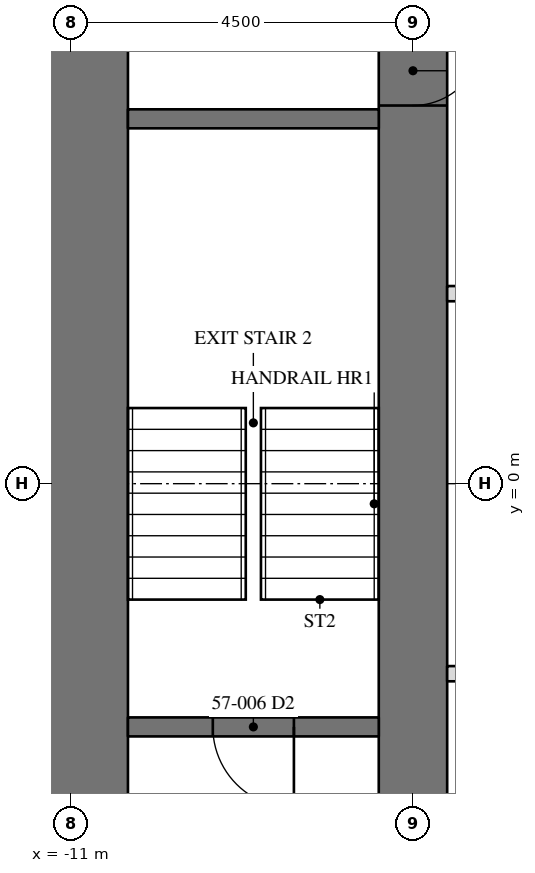
"""IFC4 building model, lengths in metres.
Left out: names, types, materials, properties, quantities, classifications, styles, units other than length and angle.
Written with IfcOpenShell. Run it as: python <this file> out.ifc"""

import sys

from ifc_helpers import new_model, si_unit, direction, frame, frame_2d, origin, place, context, subcontext, project, spatial, rectangle, extrude, element, fill, save


model = new_model("IFC4")
c1 = context("Model", 3, precision=1e-05, world=origin(), true_north=direction((0.0, 1.0)))
c2 = subcontext(c1, "Body", "Model", "MODEL_VIEW")
j1 = project(units=[si_unit("LENGTHUNIT", "METRE"), si_unit("PLANEANGLEUNIT", "RADIAN")], contexts=[c1])
p1 = place(None, origin())
s1 = spatial("IfcSite", under=j1, at=p1, CompositionType="ELEMENT")
p2 = place(p1, origin())
s2 = spatial("IfcBuilding", under=s1, at=p2, CompositionType="ELEMENT")
p3 = place(p2, frame((0.0, 0.0, 236.2)))
s3 = spatial("IfcBuildingStorey", under=s2, at=p3, CompositionType="ELEMENT", Elevation=236.2)
p4 = place(p3, frame((-11.0, 11.0, 0.0), z_axis=(0.0, 0.0, 1.0), x_axis=(0.0, -1.0, 0.0)))
e1 = element("IfcWall", 1, at=p4, inside=s3, PredefinedType="SHEAR", context=c2, shape_type="SweptSolid", body=[
    extrude(rectangle(XDim=22.0, YDim=1.5, at=frame_2d((11.0, 0.0))), origin(), (0.0, 0.0, 1.0), 3.5),
])
p5 = place(p4, frame((15.393, 0.0, 0.0)))
e2 = element("IfcOpeningElement", 2, at=p5, cuts=e1, PredefinedType="OPENING", context=c2, shape_type="SweptSolid", body=[
    extrude(rectangle(XDim=0.915, YDim=2.134, at=frame_2d((0.458, 1.067))), frame((0.0, 0.76, 0.0), z_axis=(0.0, -1.0, 0.0), x_axis=(1.0, 0.0, 0.0)), (0.0, 0.0, 1.0), 1.52),
])
p6 = place(p3, frame((-6.5, 6.5, 0.0), z_axis=(0.0, 0.0, 1.0), x_axis=(0.0, -1.0, 0.0)))
e3 = element("IfcWall", 3, at=p6, inside=s3, PredefinedType="SHEAR", context=c2, shape_type="SweptSolid", body=[
    extrude(rectangle(XDim=13.0, YDim=0.9, at=frame_2d((6.5, 0.0))), origin(), (0.0, 0.0, 1.0), 3.5),
])
p7 = place(p6, frame((10.893, 0.0, 0.0)))
e4 = element("IfcOpeningElement", 4, at=p7, cuts=e3, PredefinedType="OPENING", context=c2, shape_type="SweptSolid", body=[
    extrude(rectangle(XDim=0.915, YDim=2.134, at=frame_2d((0.458, 1.067))), frame((0.0, 0.46, 0.0), z_axis=(0.0, -1.0, 0.0), x_axis=(1.0, 0.0, 0.0)), (0.0, 0.0, 1.0), 0.92),
])
p8 = place(p6, frame((0.61, 0.0, 0.0)))
e5 = element("IfcOpeningElement", 5, at=p8, cuts=e3, PredefinedType="OPENING", context=c2, shape_type="SweptSolid", body=[
    extrude(rectangle(XDim=0.915, YDim=2.134, at=frame_2d((0.458, 1.067))), frame((0.0, 0.46, 0.0), z_axis=(0.0, -1.0, 0.0), x_axis=(1.0, 0.0, 0.0)), (0.0, 0.0, 1.0), 0.92),
])
p9 = place(p3, frame((-6.95, 4.8, 0.0), z_axis=(0.0, 0.0, 1.0), x_axis=(-1.0, 0.0, 0.0)))
e6 = element("IfcWall", 6, at=p9, inside=s3, PredefinedType="SOLIDWALL", context=c2, shape_type="SweptSolid", body=[
    extrude(rectangle(XDim=3.3, YDim=0.25, at=frame_2d((1.65, 0.0))), origin(), (0.0, 0.0, 1.0), 3.31),
])
p10 = place(p3, frame((-6.95, -3.2, 0.0), z_axis=(0.0, 0.0, 1.0), x_axis=(-1.0, 0.0, 0.0)))
e7 = element("IfcWall", 7, at=p10, inside=s3, PredefinedType="SOLIDWALL", context=c2, shape_type="SweptSolid", body=[
    extrude(rectangle(XDim=3.3, YDim=0.25, at=frame_2d((1.65, 0.0))), origin(), (0.0, 0.0, 1.0), 3.31),
])
p11 = place(p10, frame((1.116, 0.0, 0.0)))
e8 = element("IfcOpeningElement", 8, at=p11, cuts=e7, PredefinedType="OPENING", context=c2, shape_type="SweptSolid", body=[
    extrude(rectangle(XDim=1.067, YDim=2.134, at=frame_2d((0.533, 1.067))), frame((0.0, 0.135, 0.0), z_axis=(0.0, -1.0, 0.0), x_axis=(1.0, 0.0, 0.0)), (0.0, 0.0, 1.0), 0.27),
])
for number, where, z_axis, x_axis in (
    (9, (-6.05, 2.5, 0.0), (0.0, 0.0, 1.0), (1.0, 0.0, 0.0)),
    (10, (6.05, -2.5, 0.0), (0.0, 0.0, 1.0), (-1.0, 0.0, 0.0)),
):
    element("IfcWall", number, at=place(p3, frame(where, z_axis=z_axis, x_axis=x_axis)), inside=s3, PredefinedType="PARTITIONING", context=c2, shape_type="SweptSolid", body=[
        extrude(rectangle(XDim=12.1, YDim=0.2, at=frame_2d((6.05, 0.0))), origin(), (0.0, 0.0, 1.0), 3.31),
    ])
p12 = place(p11, origin())
e11 = element("IfcDoor", 11, at=p12, inside=s3, OperationType="SINGLE_SWING_LEFT", PredefinedType="DOOR", context=c2, shape_type="SweptSolid", body=[
    extrude(rectangle(XDim=1.067, YDim=2.134, at=frame_2d((0.533, 1.067))), frame((0.0, 0.025, 0.0), z_axis=(0.0, -1.0, 0.0), x_axis=(1.0, 0.0, 0.0)), (0.0, 0.0, 1.0), 0.05),
])
fill(e8, e11)
p13 = place(p8, origin())
e12 = element("IfcDoor", 12, at=p13, inside=s3, OperationType="SINGLE_SWING_RIGHT", PredefinedType="DOOR", context=c2, shape_type="SweptSolid", body=[
    extrude(rectangle(XDim=0.915, YDim=2.134, at=frame_2d((0.458, 1.067))), frame((0.0, -0.375, 0.0), z_axis=(0.0, -1.0, 0.0), x_axis=(1.0, 0.0, 0.0)), (0.0, 0.0, 1.0), 0.05),
])
fill(e5, e12)
save(model, sys.argv[1])
